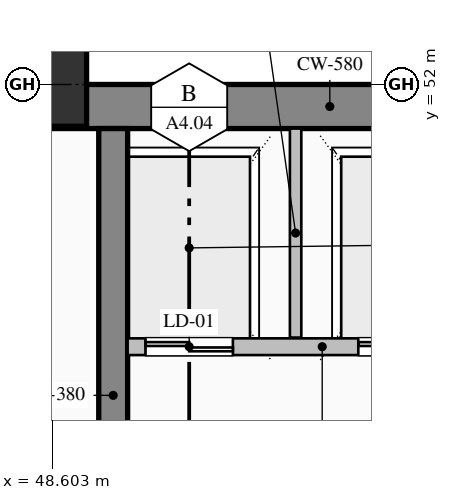
"""IFC4 building model, lengths in metres.
Left out: names, types, materials, properties, quantities, classifications, styles, units other than length and angle.
Written with IfcOpenShell. Run it as: python <this file> out.ifc"""

import sys

from ifc_helpers import new_model, si_unit, direction, frame, frame_2d, origin, origin_2d, place, context, subcontext, project, spatial, rectangle, hollow_rectangle, extrude, element, fill, save


model = new_model("IFC4")
c1 = context("Model", 3, precision=1e-05, world=origin(), true_north=direction((0.0, 1.0)))
c2 = subcontext(c1, "Body", "Model", "MODEL_VIEW")
j1 = project(units=[si_unit("LENGTHUNIT", "METRE"), si_unit("PLANEANGLEUNIT", "RADIAN")], contexts=[c1])
p1 = place(None, origin())
s1 = spatial("IfcSite", under=j1, at=p1, CompositionType="ELEMENT")
p2 = place(p1, origin())
s2 = spatial("IfcBuilding", under=s1, at=p2, CompositionType="ELEMENT")
p3 = place(p2, frame((0.0, 0.0, -4.6)))
s3 = spatial("IfcBuildingStorey", under=s2, at=p3, CompositionType="ELEMENT", Elevation=-4.6)
p4 = place(p3, frame((40.5, 51.71, 0.0), z_axis=(0.0, 0.0, 1.0), x_axis=(1.0, 0.0, 0.0)))
e1 = element("IfcWall", 1, at=p4, inside=s3, PredefinedType="SHEAR", context=c2, shape_type="SweptSolid", body=[
    extrude(rectangle(XDim=23.5, YDim=0.58, at=frame_2d((11.75, 0.0))), origin(), (0.0, 0.0, 1.0), 4.18),
])
p5 = place(p3, frame((49.4, 44.4, 0.0), z_axis=(0.0, 0.0, 1.0), x_axis=(0.0, 1.0, 0.0)))
e2 = element("IfcWall", 2, at=p5, inside=s3, PredefinedType="SHEAR", context=c2, shape_type="SweptSolid", body=[
    extrude(rectangle(XDim=7.02, YDim=0.38, at=frame_2d((3.51, 0.0))), origin(), (0.0, 0.0, 1.0), 4.18),
])
p6 = place(p3, frame((48.5, 52.0, 0.0), z_axis=(0.0, 0.0, 1.0), x_axis=(1.0, 0.0, 0.0)))
e3 = element("IfcColumn", 3, at=p6, inside=s3, PredefinedType="COLUMN", context=c2, shape_type="SweptSolid", body=[
    extrude(hollow_rectangle(XDim=1.1, YDim=1.1, WallThickness=0.04, at=origin_2d()), origin(), (0.0, 0.0, 1.0), 4.6),
])
p7 = place(p3, frame((54.71, 48.55, 0.0), z_axis=(0.0, 0.0, 1.0), x_axis=(-1.0, 0.0, 0.0)))
e4 = element("IfcWall", 4, at=p7, inside=s3, PredefinedType="PARTITIONING", context=c2, shape_type="SweptSolid", body=[
    extrude(rectangle(XDim=5.12, YDim=0.22, at=frame_2d((2.56, 0.0))), origin(), (0.0, 0.0, 1.0), 4.18),
])
p8 = place(p7, frame((3.735, 0.0, 0.0)))
e5 = element("IfcOpeningElement", 5, at=p8, cuts=e4, PredefinedType="OPENING", context=c2, shape_type="SweptSolid", body=[
    extrude(rectangle(XDim=1.15, YDim=2.2, at=frame_2d((0.575, 1.1))), frame((0.0, 0.12, 0.0), z_axis=(0.0, -1.0, 0.0), x_axis=(1.0, 0.0, 0.0)), (0.0, 0.0, 1.0), 0.24),
])
p9 = place(p7, frame((0.935, 0.0, 0.0)))
e6 = element("IfcOpeningElement", 6, at=p9, cuts=e4, PredefinedType="OPENING", context=c2, shape_type="SweptSolid", body=[
    extrude(rectangle(XDim=1.15, YDim=2.2, at=frame_2d((0.575, 1.1))), frame((0.0, 0.12, 0.0), z_axis=(0.0, -1.0, 0.0), x_axis=(1.0, 0.0, 0.0)), (0.0, 0.0, 1.0), 0.24),
])
p10 = place(p3, frame((51.8, 48.67, 0.0), z_axis=(0.0, 0.0, 1.0), x_axis=(0.0, 1.0, 0.0)))
e7 = element("IfcWall", 7, at=p10, inside=s3, PredefinedType="PARTITIONING", context=c2, shape_type="SweptSolid", body=[
    extrude(rectangle(XDim=2.75, YDim=0.15, at=frame_2d((1.375, 0.0))), origin(), (0.0, 0.0, 1.0), 4.18),
])
p11 = place(p8, origin())
e8 = element("IfcDoor", 8, at=p11, inside=s3, OperationType="DOUBLE_DOOR_SLIDING", PredefinedType="DOOR", context=c2, shape_type="SweptSolid", body=[
    extrude(rectangle(XDim=1.15, YDim=2.2, at=frame_2d((0.575, 1.1))), frame((0.0, 0.025, 0.0), z_axis=(0.0, -1.0, 0.0), x_axis=(1.0, 0.0, 0.0)), (0.0, 0.0, 1.0), 0.05),
])
fill(e5, e8)
p12 = place(p9, origin())
e9 = element("IfcDoor", 9, at=p12, inside=s3, OperationType="DOUBLE_DOOR_SLIDING", PredefinedType="DOOR", context=c2, shape_type="SweptSolid", body=[
    extrude(rectangle(XDim=1.15, YDim=2.2, at=frame_2d((0.575, 1.1))), frame((0.0, 0.025, 0.0), z_axis=(0.0, -1.0, 0.0), x_axis=(1.0, 0.0, 0.0)), (0.0, 0.0, 1.0), 0.05),
])
fill(e6, e9)
save(model, sys.argv[1])
